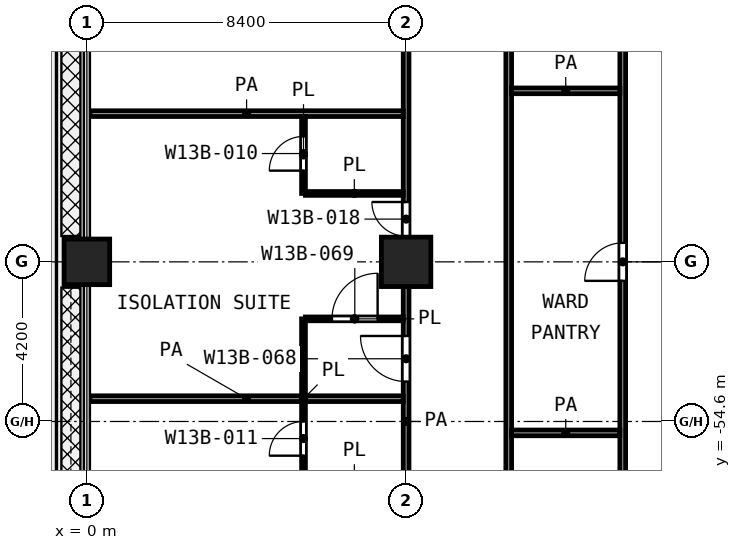
"""IFC4 building model, lengths in metres.
Left out: names, types, materials, properties, quantities, classifications, styles, units other than length and angle.
Written with IfcOpenShell. Run it as: python <this file> out.ifc"""

import sys

from ifc_helpers import new_model, si_unit, direction, frame, frame_2d, origin, origin_2d, place, context, subcontext, project, spatial, rectangle, extrude, element, fill, save


model = new_model("IFC4")
c1 = context("Model", 3, precision=1e-05, world=origin(), true_north=direction((0.0, 1.0)))
c2 = subcontext(c1, "Body", "Model", "MODEL_VIEW")
j1 = project(units=[si_unit("LENGTHUNIT", "METRE"), si_unit("PLANEANGLEUNIT", "RADIAN")], contexts=[c1])
p1 = place(None, origin())
s1 = spatial("IfcSite", under=j1, at=p1, CompositionType="ELEMENT")
p2 = place(p1, origin())
s2 = spatial("IfcBuilding", under=s1, at=p2, CompositionType="ELEMENT")
p3 = place(p2, frame((0.0, 0.0, 89.6)))
s3 = spatial("IfcBuildingStorey", under=s2, at=p3, CompositionType="ELEMENT", Elevation=89.6)
p4 = place(p3, frame((0.0, -50.4, 0.0), z_axis=(0.0, 0.0, 1.0), x_axis=(1.0, 0.0, 0.0)))
e1 = element("IfcColumn", 1, at=p4, inside=s3, PredefinedType="COLUMN", context=c2, shape_type="SweptSolid", body=[
    extrude(rectangle(XDim=1.2, YDim=1.2, at=origin_2d()), origin(), (0.0, 0.0, 1.0), 4.2),
])
p5 = place(p3, frame((8.4, -50.4, 0.0), z_axis=(0.0, 0.0, 1.0), x_axis=(1.0, 0.0, 0.0)))
e2 = element("IfcColumn", 2, at=p5, inside=s3, PredefinedType="COLUMN", context=c2, shape_type="SweptSolid", body=[
    extrude(rectangle(XDim=1.3, YDim=1.3, at=origin_2d()), origin(), (0.0, 0.0, 1.0), 4.2),
])
p6 = place(p3, frame((5.75, -51.9, 0.0), z_axis=(0.0, 0.0, 1.0), x_axis=(1.0, 0.0, 0.0)))
e3 = element("IfcWall", 3, at=p6, inside=s3, PredefinedType="PARTITIONING", context=c2, shape_type="SweptSolid", body=[
    extrude(rectangle(XDim=2.575, YDim=0.1, at=frame_2d((1.288, 0.0))), origin(), (0.0, 0.0, 1.0), 3.7),
])
p7 = place(p6, frame((0.7, 0.0, 0.0)))
e4 = element("IfcOpeningElement", 4, at=p7, cuts=e3, PredefinedType="OPENING", context=c2, shape_type="SweptSolid", body=[
    extrude(rectangle(XDim=1.2, YDim=2.1, at=frame_2d((0.6, 1.05))), frame((0.0, 0.06, 0.0), z_axis=(0.0, -1.0, 0.0), x_axis=(1.0, 0.0, 0.0)), (0.0, 0.0, 1.0), 0.12),
])
p8 = place(p3, frame((5.75, -48.6, 0.0), z_axis=(0.0, 0.0, 1.0), x_axis=(1.0, 0.0, 0.0)))
e5 = element("IfcWall", 5, at=p8, inside=s3, PredefinedType="PARTITIONING", context=c2, shape_type="SweptSolid", body=[
    extrude(rectangle(XDim=2.575, YDim=0.1, at=frame_2d((1.288, 0.0))), origin(), (0.0, 0.0, 1.0), 3.7),
])
p9 = place(p3, frame((5.7, -56.1, 0.0), z_axis=(0.0, 0.0, 1.0), x_axis=(0.0, 1.0, 0.0)))
e6 = element("IfcWall", 6, at=p9, inside=s3, PredefinedType="PARTITIONING", context=c2, shape_type="SweptSolid", body=[
    extrude(rectangle(XDim=4.2, YDim=0.1, at=frame_2d((2.1, 0.0))), origin(), (0.0, 0.0, 1.0), 3.7),
])
p10 = place(p9, frame((0.6, 0.0, 0.0)))
e7 = element("IfcOpeningElement", 7, at=p10, cuts=e6, PredefinedType="OPENING", context=c2, shape_type="SweptSolid", body=[
    extrude(rectangle(XDim=0.9, YDim=2.1, at=frame_2d((0.45, 1.05))), frame((0.0, 0.06, 0.0), z_axis=(0.0, -1.0, 0.0), x_axis=(1.0, 0.0, 0.0)), (0.0, 0.0, 1.0), 0.12),
])
p11 = place(p3, frame((5.7, -48.6, 0.0), z_axis=(0.0, 0.0, 1.0), x_axis=(0.0, 1.0, 0.0)))
e8 = element("IfcWall", 8, at=p11, inside=s3, PredefinedType="PARTITIONING", context=c2, shape_type="SweptSolid", body=[
    extrude(rectangle(XDim=2.025, YDim=0.1, at=frame_2d((1.013, 0.0))), origin(), (0.0, 0.0, 1.0), 3.7),
])
p12 = place(p11, frame((0.6, 0.0, 0.0)))
e9 = element("IfcOpeningElement", 9, at=p12, cuts=e8, PredefinedType="OPENING", context=c2, shape_type="SweptSolid", body=[
    extrude(rectangle(XDim=0.9, YDim=2.1, at=frame_2d((0.45, 1.05))), frame((0.0, 0.06, 0.0), z_axis=(0.0, -1.0, 0.0), x_axis=(1.0, 0.0, 0.0)), (0.0, 0.0, 1.0), 0.12),
])
p13 = place(p3, frame((11.175, -54.9, 0.0), z_axis=(0.0, 0.0, 1.0), x_axis=(1.0, 0.0, 0.0)))
e10 = element("IfcWall", 10, at=p13, inside=s3, PredefinedType="PARTITIONING", context=c2, shape_type="SweptSolid", body=[
    extrude(rectangle(XDim=2.85, YDim=0.15, at=frame_2d((1.425, 0.0))), origin(), (0.0, 0.0, 1.0), 3.7),
])
for number, where, z_axis, x_axis in (
    (11, (0.08, -54.0, 0.0), (0.0, 0.0, 1.0), (1.0, 0.0, 0.0)),
    (12, (0.08, -46.5, 0.0), (0.0, 0.0, 1.0), (1.0, 0.0, 0.0)),
):
    element("IfcWall", number, at=place(p3, frame(where, z_axis=z_axis, x_axis=x_axis)), inside=s3, PredefinedType="PARTITIONING", context=c2, shape_type="SweptSolid", body=[
        extrude(rectangle(XDim=8.245, YDim=0.15, at=frame_2d((4.123, 0.0))), origin(), (0.0, 0.0, 1.0), 3.7),
    ])
p14 = place(p3, frame((11.175, -45.9, 0.0), z_axis=(0.0, 0.0, 1.0), x_axis=(1.0, 0.0, 0.0)))
e13 = element("IfcWall", 13, at=p14, inside=s3, PredefinedType="PARTITIONING", context=c2, shape_type="SweptSolid", body=[
    extrude(rectangle(XDim=2.85, YDim=0.15, at=frame_2d((1.425, 0.0))), origin(), (0.0, 0.0, 1.0), 3.7),
])
p15 = place(p3, frame((8.4, -66.55, 0.0), z_axis=(0.0, 0.0, 1.0), x_axis=(0.0, 1.0, 0.0)))
e14 = element("IfcWall", 14, at=p15, inside=s3, PredefinedType="PARTITIONING", context=c2, shape_type="SweptSolid", body=[
    extrude(rectangle(XDim=23.9, YDim=0.15, at=frame_2d((11.95, 0.0))), origin(), (0.0, 0.0, 1.0), 3.7),
])
p16 = place(p15, frame((16.825, 0.0, 0.0)))
e15 = element("IfcOpeningElement", 15, at=p16, cuts=e14, PredefinedType="OPENING", context=c2, shape_type="SweptSolid", body=[
    extrude(rectangle(XDim=0.9, YDim=2.1, at=frame_2d((0.45, 1.05))), frame((0.0, 0.085, 0.0), z_axis=(0.0, -1.0, 0.0), x_axis=(1.0, 0.0, 0.0)), (0.0, 0.0, 1.0), 0.17),
])
p17 = place(p15, frame((13.0, 0.0, 0.0)))
e16 = element("IfcOpeningElement", 16, at=p17, cuts=e14, PredefinedType="OPENING", context=c2, shape_type="SweptSolid", body=[
    extrude(rectangle(XDim=1.2, YDim=2.1, at=frame_2d((0.6, 1.05))), frame((0.0, 0.085, 0.0), z_axis=(0.0, -1.0, 0.0), x_axis=(1.0, 0.0, 0.0)), (0.0, 0.0, 1.0), 0.17),
])
p18 = place(p15, frame((5.85, 0.0, 0.0)))
e17 = element("IfcOpeningElement", 17, at=p18, cuts=e14, PredefinedType="OPENING", context=c2, shape_type="SweptSolid", body=[
    extrude(rectangle(XDim=1.2, YDim=2.1, at=frame_2d((0.6, 1.05))), frame((0.0, 0.085, 0.0), z_axis=(0.0, -1.0, 0.0), x_axis=(1.0, 0.0, 0.0)), (0.0, 0.0, 1.0), 0.17),
])
p19 = place(p15, frame((8.45, 0.0, 0.0)))
e18 = element("IfcOpeningElement", 18, at=p19, cuts=e14, PredefinedType="OPENING", context=c2, shape_type="SweptSolid", body=[
    extrude(rectangle(XDim=1.2, YDim=2.1, at=frame_2d((0.6, 1.05))), frame((0.0, 0.085, 0.0), z_axis=(0.0, -1.0, 0.0), x_axis=(1.0, 0.0, 0.0)), (0.0, 0.0, 1.0), 0.17),
])
p20 = place(p15, frame((4.0, 0.0, 0.0)))
e19 = element("IfcOpeningElement", 19, at=p20, cuts=e14, PredefinedType="OPENING", context=c2, shape_type="SweptSolid", body=[
    extrude(rectangle(XDim=1.2, YDim=2.1, at=frame_2d((0.6, 1.05))), frame((0.0, 0.085, 0.0), z_axis=(0.0, -1.0, 0.0), x_axis=(1.0, 0.0, 0.0)), (0.0, 0.0, 1.0), 0.17),
])
p21 = place(p15, frame((1.325, 0.0, 0.0)))
e20 = element("IfcOpeningElement", 20, at=p21, cuts=e14, PredefinedType="OPENING", context=c2, shape_type="SweptSolid", body=[
    extrude(rectangle(XDim=0.9, YDim=2.1, at=frame_2d((0.45, 1.05))), frame((0.0, 0.085, 0.0), z_axis=(0.0, -1.0, 0.0), x_axis=(1.0, 0.0, 0.0)), (0.0, 0.0, 1.0), 0.17),
])
p22 = place(p3, frame((11.1, -58.7, 0.0), z_axis=(0.0, 0.0, 1.0), x_axis=(0.0, 1.0, 0.0)))
e21 = element("IfcWall", 21, at=p22, inside=s3, PredefinedType="PARTITIONING", context=c2, shape_type="SweptSolid", body=[
    extrude(rectangle(XDim=29.3, YDim=0.15, at=frame_2d((14.65, 0.0))), origin(), (0.0, 0.0, 1.0), 3.7),
])
p23 = place(p22, frame((20.55, 0.0, 0.0)))
e22 = element("IfcOpeningElement", 22, at=p23, cuts=e21, PredefinedType="OPENING", context=c2, shape_type="SweptSolid", body=[
    extrude(rectangle(XDim=1.0, YDim=2.1, at=frame_2d((0.5, 1.05))), frame((0.0, 0.085, 0.0), z_axis=(0.0, -1.0, 0.0), x_axis=(1.0, 0.0, 0.0)), (0.0, 0.0, 1.0), 0.17),
])
p24 = place(p22, frame((1.35, 0.0, 0.0)))
e23 = element("IfcOpeningElement", 23, at=p24, cuts=e21, PredefinedType="OPENING", context=c2, shape_type="SweptSolid", body=[
    extrude(rectangle(XDim=1.0, YDim=2.1, at=frame_2d((0.5, 1.05))), frame((0.0, 0.085, 0.0), z_axis=(0.0, -1.0, 0.0), x_axis=(1.0, 0.0, 0.0)), (0.0, 0.0, 1.0), 0.17),
])
p25 = place(p3, frame((14.1, -58.7, 0.0), z_axis=(0.0, 0.0, 1.0), x_axis=(0.0, 1.0, 0.0)))
e24 = element("IfcWall", 24, at=p25, inside=s3, PredefinedType="PARTITIONING", context=c2, shape_type="SweptSolid", body=[
    extrude(rectangle(XDim=29.3, YDim=0.15, at=frame_2d((14.65, 0.0))), origin(), (0.0, 0.0, 1.0), 3.7),
])
p26 = place(p25, frame((7.8, 0.0, 0.0)))
e25 = element("IfcOpeningElement", 25, at=p26, cuts=e24, PredefinedType="OPENING", context=c2, shape_type="SweptSolid", body=[
    extrude(rectangle(XDim=1.0, YDim=2.1, at=frame_2d((0.5, 1.05))), frame((0.0, 0.085, 0.0), z_axis=(0.0, -1.0, 0.0), x_axis=(1.0, 0.0, 0.0)), (0.0, 0.0, 1.0), 0.17),
])
p27 = place(p16, origin())
e26 = element("IfcDoor", 26, at=p27, inside=s3, OperationType="SINGLE_SWING_RIGHT", PredefinedType="DOOR", context=c2, shape_type="SweptSolid", body=[
    extrude(rectangle(XDim=0.9, YDim=2.1, at=frame_2d((0.45, 1.05))), frame((0.0, 0.025, 0.0), z_axis=(0.0, -1.0, 0.0), x_axis=(1.0, 0.0, 0.0)), (0.0, 0.0, 1.0), 0.05),
])
fill(e15, e26)
p28 = place(p17, origin())
e27 = element("IfcDoor", 27, at=p28, inside=s3, OperationType="SINGLE_SWING_RIGHT", PredefinedType="DOOR", context=c2, shape_type="SweptSolid", body=[
    extrude(rectangle(XDim=1.2, YDim=2.1, at=frame_2d((0.6, 1.05))), frame((0.0, 0.025, 0.0), z_axis=(0.0, -1.0, 0.0), x_axis=(1.0, 0.0, 0.0)), (0.0, 0.0, 1.0), 0.05),
])
fill(e16, e27)
p29 = place(p7, origin())
e28 = element("IfcDoor", 28, at=p29, inside=s3, OperationType="SINGLE_SWING_RIGHT", PredefinedType="DOOR", context=c2, shape_type="SweptSolid", body=[
    extrude(rectangle(XDim=1.2, YDim=2.1, at=frame_2d((0.6, 1.05))), frame((0.0, 0.025, 0.0), z_axis=(0.0, -1.0, 0.0), x_axis=(1.0, 0.0, 0.0)), (0.0, 0.0, 1.0), 0.05),
])
fill(e4, e28)
p30 = place(p12, origin())
e29 = element("IfcDoor", 29, at=p30, inside=s3, OperationType="SINGLE_SWING_LEFT", PredefinedType="DOOR", context=c2, shape_type="SweptSolid", body=[
    extrude(rectangle(XDim=0.9, YDim=2.1, at=frame_2d((0.45, 1.05))), frame((0.0, 0.025, 0.0), z_axis=(0.0, -1.0, 0.0), x_axis=(1.0, 0.0, 0.0)), (0.0, 0.0, 1.0), 0.05),
])
fill(e9, e29)
p31 = place(p10, origin())
e30 = element("IfcDoor", 30, at=p31, inside=s3, OperationType="SINGLE_SWING_LEFT", PredefinedType="DOOR", context=c2, shape_type="SweptSolid", body=[
    extrude(rectangle(XDim=0.9, YDim=2.1, at=frame_2d((0.45, 1.05))), frame((0.0, 0.025, 0.0), z_axis=(0.0, -1.0, 0.0), x_axis=(1.0, 0.0, 0.0)), (0.0, 0.0, 1.0), 0.05),
])
fill(e7, e30)
p32 = place(p26, origin())
e31 = element("IfcDoor", 31, at=p32, inside=s3, OperationType="SINGLE_SWING_LEFT", PredefinedType="DOOR", context=c2, shape_type="SweptSolid", body=[
    extrude(rectangle(XDim=1.0, YDim=2.1, at=frame_2d((0.5, 1.05))), frame((0.0, 0.025, 0.0), z_axis=(0.0, -1.0, 0.0), x_axis=(1.0, 0.0, 0.0)), (0.0, 0.0, 1.0), 0.05),
])
fill(e25, e31)
save(model, sys.argv[1])
